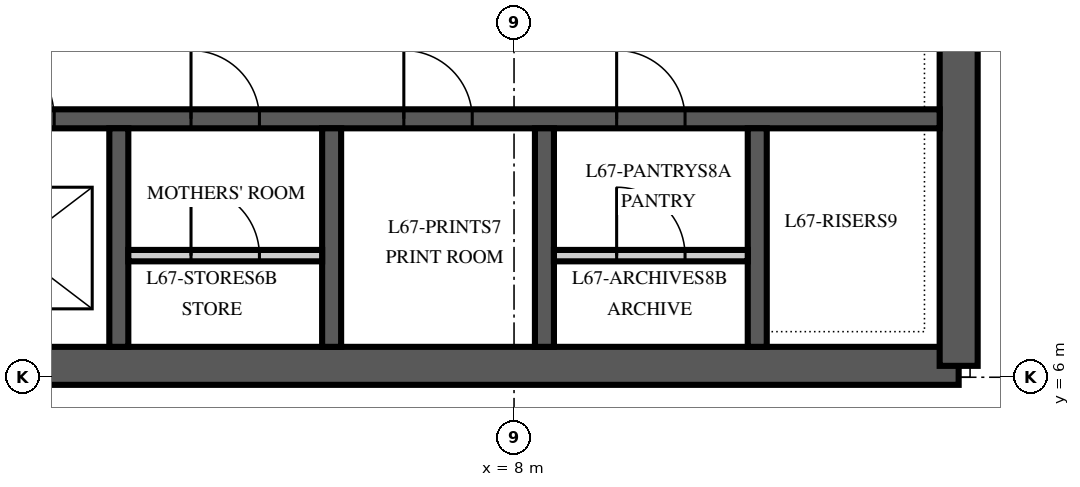
"""IFC4 building model, lengths in metres.
Left out: names, types, materials, properties, quantities, classifications, styles, units other than length and angle.
Written with IfcOpenShell. Run it as: python <this file> out.ifc"""

import sys

from ifc_helpers import new_model, si_unit, direction, frame, frame_2d, origin, place, context, subcontext, project, spatial, polyline, rectangle, outline, extrude, element, fill, save


model = new_model("IFC4")
c1 = context("Model", 3, precision=1e-05, world=origin(), true_north=direction((0.0, 1.0)))
c2 = subcontext(c1, "Body", "Model", "MODEL_VIEW")
j1 = project(units=[si_unit("LENGTHUNIT", "METRE"), si_unit("PLANEANGLEUNIT", "RADIAN")], contexts=[c1])
p1 = place(None, origin())
s1 = spatial("IfcSite", under=j1, at=p1, CompositionType="ELEMENT")
p2 = place(p1, origin())
s2 = spatial("IfcBuilding", under=s1, at=p2, CompositionType="ELEMENT")
p3 = place(p2, frame((0.0, 0.0, 288.0)))
s3 = spatial("IfcBuildingStorey", under=s2, at=p3, CompositionType="ELEMENT", Elevation=288.0)
p4 = place(p3, frame((-13.85, 6.15, 0.0), z_axis=(0.0, 0.0, 1.0), x_axis=(1.0, 0.0, 0.0)))
e1 = element("IfcWall", 1, at=p4, inside=s3, PredefinedType="SHEAR", context=c2, shape_type="SweptSolid", body=[
    extrude(rectangle(XDim=27.7, YDim=0.5, at=frame_2d((13.85, 0.0))), origin(), (0.0, 0.0, 1.0), 4.0),
])
p5 = place(p3, frame((13.85, 6.15, 0.0), z_axis=(0.0, 0.0, 1.0), x_axis=(0.0, 1.0, 0.0)))
e2 = element("IfcWall", 2, at=p5, inside=s3, PredefinedType="SHEAR", context=c2, shape_type="SweptSolid", body=[
    extrude(outline(polyline([(0.0, -0.25), (17.7, -0.25), (17.7, 0.0), (17.45, 0.0), (17.45, 0.25), (0.25, 0.25), (0.25, 0.0), (0.0, 0.0), (0.0, -0.25)])), origin(), (0.0, 0.0, 1.0), 4.0),
])
p6 = place(p5, frame((4.15, 0.0, 0.0)))
e3 = element("IfcOpeningElement", 3, at=p6, cuts=e2, PredefinedType="OPENING", context=c2, shape_type="SweptSolid", body=[
    extrude(rectangle(XDim=1.8, YDim=2.4, at=frame_2d((0.9, 1.2))), frame((0.0, 0.265, 0.0), z_axis=(0.0, -1.0, 0.0), x_axis=(1.0, 0.0, 0.0)), (0.0, 0.0, 1.0), 0.53),
])
p7 = place(p3, frame((-13.6, 9.4, 0.0), z_axis=(0.0, 0.0, 1.0), x_axis=(1.0, 0.0, 0.0)))
e4 = element("IfcWall", 4, at=p7, inside=s3, PredefinedType="SHEAR", context=c2, shape_type="SweptSolid", body=[
    extrude(rectangle(XDim=27.2, YDim=0.25, at=frame_2d((13.6, 0.0))), origin(), (0.0, 0.0, 1.0), 4.0),
])
p8 = place(p7, frame((8.85, 0.0, 0.0)))
e5 = element("IfcOpeningElement", 5, at=p8, cuts=e4, PredefinedType="OPENING", context=c2, shape_type="SweptSolid", body=[
    extrude(rectangle(XDim=1.1, YDim=2.1, at=frame_2d((0.55, 1.05))), frame((0.0, 0.14, 0.0), z_axis=(0.0, -1.0, 0.0), x_axis=(1.0, 0.0, 0.0)), (0.0, 0.0, 1.0), 0.28),
])
p9 = place(p7, frame((11.65, 0.0, 0.0)))
e6 = element("IfcOpeningElement", 6, at=p9, cuts=e4, PredefinedType="OPENING", context=c2, shape_type="SweptSolid", body=[
    extrude(rectangle(XDim=1.1, YDim=2.1, at=frame_2d((0.55, 1.05))), frame((0.0, 0.14, 0.0), z_axis=(0.0, -1.0, 0.0), x_axis=(1.0, 0.0, 0.0)), (0.0, 0.0, 1.0), 0.28),
])
p10 = place(p7, frame((14.45, 0.0, 0.0)))
e7 = element("IfcOpeningElement", 7, at=p10, cuts=e4, PredefinedType="OPENING", context=c2, shape_type="SweptSolid", body=[
    extrude(rectangle(XDim=1.1, YDim=2.1, at=frame_2d((0.55, 1.05))), frame((0.0, 0.14, 0.0), z_axis=(0.0, -1.0, 0.0), x_axis=(1.0, 0.0, 0.0)), (0.0, 0.0, 1.0), 0.28),
])
p11 = place(p7, frame((0.55, 0.0, 0.0)))
e8 = element("IfcOpeningElement", 8, at=p11, cuts=e4, PredefinedType="OPENING", context=c2, shape_type="SweptSolid", body=[
    extrude(rectangle(XDim=0.9, YDim=2.1, at=frame_2d((0.45, 1.05))), frame((0.0, 0.14, 0.0), z_axis=(0.0, -1.0, 0.0), x_axis=(1.0, 0.0, 0.0)), (0.0, 0.0, 1.0), 0.28),
])
p12 = place(p7, frame((3.35, 0.0, 0.0)))
e9 = element("IfcOpeningElement", 9, at=p12, cuts=e4, PredefinedType="OPENING", context=c2, shape_type="SweptSolid", body=[
    extrude(rectangle(XDim=0.9, YDim=2.1, at=frame_2d((0.45, 1.05))), frame((0.0, 0.14, 0.0), z_axis=(0.0, -1.0, 0.0), x_axis=(1.0, 0.0, 0.0)), (0.0, 0.0, 1.0), 0.28),
])
p13 = place(p7, frame((6.15, 0.0, 0.0)))
e10 = element("IfcOpeningElement", 10, at=p13, cuts=e4, PredefinedType="OPENING", context=c2, shape_type="SweptSolid", body=[
    extrude(rectangle(XDim=0.9, YDim=2.1, at=frame_2d((0.45, 1.05))), frame((0.0, 0.14, 0.0), z_axis=(0.0, -1.0, 0.0), x_axis=(1.0, 0.0, 0.0)), (0.0, 0.0, 1.0), 0.28),
])
p14 = place(p7, frame((17.35, 0.0, 0.0)))
e11 = element("IfcOpeningElement", 11, at=p14, cuts=e4, PredefinedType="OPENING", context=c2, shape_type="SweptSolid", body=[
    extrude(rectangle(XDim=0.9, YDim=2.1, at=frame_2d((0.45, 1.05))), frame((0.0, 0.14, 0.0), z_axis=(0.0, -1.0, 0.0), x_axis=(1.0, 0.0, 0.0)), (0.0, 0.0, 1.0), 0.28),
])
p15 = place(p7, frame((20.15, 0.0, 0.0)))
e12 = element("IfcOpeningElement", 12, at=p15, cuts=e4, PredefinedType="OPENING", context=c2, shape_type="SweptSolid", body=[
    extrude(rectangle(XDim=0.9, YDim=2.1, at=frame_2d((0.45, 1.05))), frame((0.0, 0.14, 0.0), z_axis=(0.0, -1.0, 0.0), x_axis=(1.0, 0.0, 0.0)), (0.0, 0.0, 1.0), 0.28),
])
p16 = place(p7, frame((22.95, 0.0, 0.0)))
e13 = element("IfcOpeningElement", 13, at=p16, cuts=e4, PredefinedType="OPENING", context=c2, shape_type="SweptSolid", body=[
    extrude(rectangle(XDim=0.9, YDim=2.1, at=frame_2d((0.45, 1.05))), frame((0.0, 0.14, 0.0), z_axis=(0.0, -1.0, 0.0), x_axis=(1.0, 0.0, 0.0)), (0.0, 0.0, 1.0), 0.28),
])
for number, where, z_axis, x_axis in (
    (14, (2.8, 6.4, 0.0), (0.0, 0.0, 1.0), (0.0, 1.0, 0.0)),
    (15, (5.6, 6.4, 0.0), (0.0, 0.0, 1.0), (0.0, 1.0, 0.0)),
    (16, (8.4, 6.4, 0.0), (0.0, 0.0, 1.0), (0.0, 1.0, 0.0)),
    (17, (11.2, 6.4, 0.0), (0.0, 0.0, 1.0), (0.0, 1.0, 0.0)),
):
    element("IfcWall", number, at=place(p3, frame(where, z_axis=z_axis, x_axis=x_axis)), inside=s3, PredefinedType="SHEAR", context=c2, shape_type="SweptSolid", body=[
        extrude(rectangle(XDim=2.875, YDim=0.25, at=frame_2d((1.438, 0.0))), origin(), (0.0, 0.0, 1.0), 4.0),
    ])
p17 = place(p3, frame((2.925, 7.6, 0.0), z_axis=(0.0, 0.0, 1.0), x_axis=(1.0, 0.0, 0.0)))
e18 = element("IfcWall", 18, at=p17, inside=s3, PredefinedType="PARTITIONING", context=c2, shape_type="SweptSolid", body=[
    extrude(rectangle(XDim=2.55, YDim=0.15, at=frame_2d((1.275, 0.0))), origin(), (0.0, 0.0, 1.0), 3.85),
])
p18 = place(p17, frame((0.825, 0.0, 0.0)))
e19 = element("IfcOpeningElement", 19, at=p18, cuts=e18, PredefinedType="OPENING", context=c2, shape_type="SweptSolid", body=[
    extrude(rectangle(XDim=0.9, YDim=2.1, at=frame_2d((0.45, 1.05))), frame((0.0, 0.09, 0.0), z_axis=(0.0, -1.0, 0.0), x_axis=(1.0, 0.0, 0.0)), (0.0, 0.0, 1.0), 0.18),
])
p19 = place(p3, frame((8.525, 7.6, 0.0), z_axis=(0.0, 0.0, 1.0), x_axis=(1.0, 0.0, 0.0)))
e20 = element("IfcWall", 20, at=p19, inside=s3, PredefinedType="PARTITIONING", context=c2, shape_type="SweptSolid", body=[
    extrude(rectangle(XDim=2.55, YDim=0.15, at=frame_2d((1.275, 0.0))), origin(), (0.0, 0.0, 1.0), 3.85),
])
p20 = place(p19, frame((0.825, 0.0, 0.0)))
e21 = element("IfcOpeningElement", 21, at=p20, cuts=e20, PredefinedType="OPENING", context=c2, shape_type="SweptSolid", body=[
    extrude(rectangle(XDim=0.9, YDim=2.1, at=frame_2d((0.45, 1.05))), frame((0.0, 0.09, 0.0), z_axis=(0.0, -1.0, 0.0), x_axis=(1.0, 0.0, 0.0)), (0.0, 0.0, 1.0), 0.18),
])
p21 = place(p10, origin())
e22 = element("IfcDoor", 22, at=p21, inside=s3, OperationType="SLIDING_TO_LEFT", PredefinedType="DOOR", context=c2, shape_type="SweptSolid", body=[
    extrude(rectangle(XDim=1.1, YDim=2.1, at=frame_2d((0.55, 1.05))), frame((0.0, 0.125, 0.0), z_axis=(0.0, -1.0, 0.0), x_axis=(1.0, 0.0, 0.0)), (0.0, 0.0, 1.0), 0.25),
])
fill(e7, e22)
p22 = place(p14, origin())
e23 = element("IfcDoor", 23, at=p22, inside=s3, OperationType="SINGLE_SWING_LEFT", PredefinedType="DOOR", context=c2, shape_type="SweptSolid", body=[
    extrude(rectangle(XDim=0.9, YDim=2.1, at=frame_2d((0.45, 1.05))), frame((0.0, 0.125, 0.0), z_axis=(0.0, -1.0, 0.0), x_axis=(1.0, 0.0, 0.0)), (0.0, 0.0, 1.0), 0.25),
])
fill(e11, e23)
p23 = place(p18, origin())
e24 = element("IfcDoor", 24, at=p23, inside=s3, OperationType="SINGLE_SWING_LEFT", PredefinedType="DOOR", context=c2, shape_type="SweptSolid", body=[
    extrude(rectangle(XDim=0.9, YDim=2.1, at=frame_2d((0.45, 1.05))), frame((0.0, 0.075, 0.0), z_axis=(0.0, -1.0, 0.0), x_axis=(1.0, 0.0, 0.0)), (0.0, 0.0, 1.0), 0.149),
])
fill(e19, e24)
p24 = place(p15, origin())
e25 = element("IfcDoor", 25, at=p24, inside=s3, OperationType="SINGLE_SWING_LEFT", PredefinedType="DOOR", context=c2, shape_type="SweptSolid", body=[
    extrude(rectangle(XDim=0.9, YDim=2.1, at=frame_2d((0.45, 1.05))), frame((0.0, 0.125, 0.0), z_axis=(0.0, -1.0, 0.0), x_axis=(1.0, 0.0, 0.0)), (0.0, 0.0, 1.0), 0.25),
])
fill(e12, e25)
p25 = place(p16, origin())
e26 = element("IfcDoor", 26, at=p25, inside=s3, OperationType="SINGLE_SWING_LEFT", PredefinedType="DOOR", context=c2, shape_type="SweptSolid", body=[
    extrude(rectangle(XDim=0.9, YDim=2.1, at=frame_2d((0.45, 1.05))), frame((0.0, 0.125, 0.0), z_axis=(0.0, -1.0, 0.0), x_axis=(1.0, 0.0, 0.0)), (0.0, 0.0, 1.0), 0.25),
])
fill(e13, e26)
p26 = place(p20, origin())
e27 = element("IfcDoor", 27, at=p26, inside=s3, OperationType="SINGLE_SWING_LEFT", PredefinedType="DOOR", context=c2, shape_type="SweptSolid", body=[
    extrude(rectangle(XDim=0.9, YDim=2.1, at=frame_2d((0.45, 1.05))), frame((0.0, 0.075, 0.0), z_axis=(0.0, -1.0, 0.0), x_axis=(1.0, 0.0, 0.0)), (0.0, 0.0, 1.0), 0.149),
])
fill(e21, e27)
save(model, sys.argv[1])
